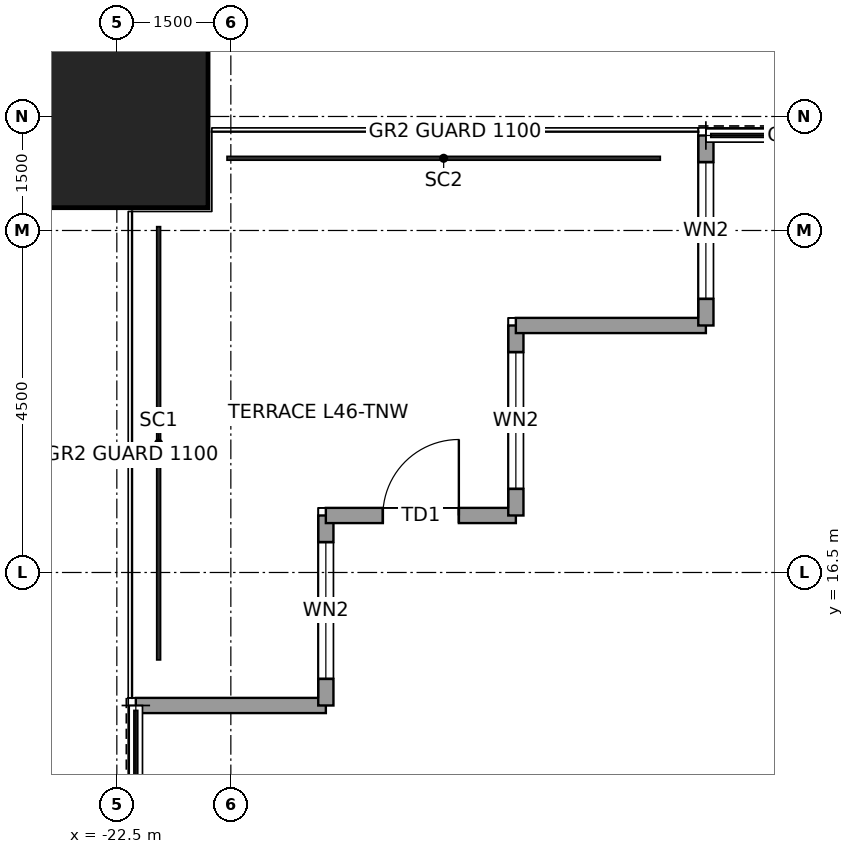
"""IFC4 building model, lengths in metres.
Left out: names, types, materials, properties, quantities, classifications, styles, units other than length and angle.
Written with IfcOpenShell. Run it as: python <this file> out.ifc"""

import sys

from ifc_helpers import new_model, si_unit, direction, frame, frame_2d, origin, origin_2d, place, context, subcontext, project, spatial, rectangle, hollow_rectangle, extrude, element, fill, save


model = new_model("IFC4")
c1 = context("Model", 3, precision=1e-05, world=origin(), true_north=direction((0.0, 1.0)))
c2 = subcontext(c1, "Body", "Model", "MODEL_VIEW")
j1 = project(units=[si_unit("LENGTHUNIT", "METRE"), si_unit("PLANEANGLEUNIT", "RADIAN")], contexts=[c1])
p1 = place(None, origin())
s1 = spatial("IfcSite", under=j1, at=p1, CompositionType="ELEMENT")
p2 = place(p1, origin())
s2 = spatial("IfcBuilding", under=s1, at=p2, CompositionType="ELEMENT")
p3 = place(p2, frame((0.0, 0.0, 217.9)))
s3 = spatial("IfcBuildingStorey", under=s2, at=p3, CompositionType="ELEMENT", Elevation=217.9)
p4 = place(p3, frame((-22.5, 22.5, 0.0), z_axis=(0.0, 0.0, 1.0), x_axis=(1.0, 0.0, 0.0)))
e1 = element("IfcColumn", 1, at=p4, inside=s3, PredefinedType="COLUMN", context=c2, shape_type="SweptSolid", body=[
    extrude(hollow_rectangle(XDim=2.4, YDim=2.4, WallThickness=0.12, at=origin_2d()), origin(), (0.0, 0.0, 1.0), 4.0),
])
p5 = place(p3, frame((-22.25, 14.75, 0.0), z_axis=(0.0, 0.0, 1.0), x_axis=(1.0, 0.0, 0.0)))
e2 = element("IfcWall", 2, at=p5, inside=s3, PredefinedType="SOLIDWALL", context=c2, shape_type="SweptSolid", body=[
    extrude(rectangle(XDim=2.5, YDim=0.2, at=frame_2d((1.25, 0.0))), origin(), (0.0, 0.0, 1.0), 3.85),
])
p6 = place(p3, frame((-19.75, 14.75, 0.0), z_axis=(0.0, 0.0, 1.0), x_axis=(0.0, 1.0, 0.0)))
e3 = element("IfcWall", 3, at=p6, inside=s3, PredefinedType="SOLIDWALL", context=c2, shape_type="SweptSolid", body=[
    extrude(rectangle(XDim=2.5, YDim=0.2, at=frame_2d((1.25, 0.0))), origin(), (0.0, 0.0, 1.0), 3.85),
])
p7 = place(p6, frame((0.35, 0.0, 0.3)))
e4 = element("IfcOpeningElement", 4, at=p7, cuts=e3, PredefinedType="OPENING", context=c2, shape_type="SweptSolid", body=[
    extrude(rectangle(XDim=1.8, YDim=2.4, at=frame_2d((0.9, 1.2))), frame((0.0, 0.11, 0.0), z_axis=(0.0, -1.0, 0.0), x_axis=(1.0, 0.0, 0.0)), (0.0, 0.0, 1.0), 0.22),
])
p8 = place(p3, frame((-19.75, 17.25, 0.0), z_axis=(0.0, 0.0, 1.0), x_axis=(1.0, 0.0, 0.0)))
e5 = element("IfcWall", 5, at=p8, inside=s3, PredefinedType="SOLIDWALL", context=c2, shape_type="SweptSolid", body=[
    extrude(rectangle(XDim=2.5, YDim=0.2, at=frame_2d((1.25, 0.0))), origin(), (0.0, 0.0, 1.0), 3.85),
])
p9 = place(p8, frame((0.75, 0.0, 0.0)))
e6 = element("IfcOpeningElement", 6, at=p9, cuts=e5, PredefinedType="OPENING", context=c2, shape_type="SweptSolid", body=[
    extrude(rectangle(XDim=1.0, YDim=2.4, at=frame_2d((0.5, 1.2))), frame((0.0, 0.11, 0.0), z_axis=(0.0, -1.0, 0.0), x_axis=(1.0, 0.0, 0.0)), (0.0, 0.0, 1.0), 0.22),
])
p10 = place(p3, frame((-17.25, 17.25, 0.0), z_axis=(0.0, 0.0, 1.0), x_axis=(0.0, 1.0, 0.0)))
e7 = element("IfcWall", 7, at=p10, inside=s3, PredefinedType="SOLIDWALL", context=c2, shape_type="SweptSolid", body=[
    extrude(rectangle(XDim=2.5, YDim=0.2, at=frame_2d((1.25, 0.0))), origin(), (0.0, 0.0, 1.0), 3.85),
])
p11 = place(p10, frame((0.35, 0.0, 0.3)))
e8 = element("IfcOpeningElement", 8, at=p11, cuts=e7, PredefinedType="OPENING", context=c2, shape_type="SweptSolid", body=[
    extrude(rectangle(XDim=1.8, YDim=2.4, at=frame_2d((0.9, 1.2))), frame((0.0, 0.11, 0.0), z_axis=(0.0, -1.0, 0.0), x_axis=(1.0, 0.0, 0.0)), (0.0, 0.0, 1.0), 0.22),
])
p12 = place(p3, frame((-17.25, 19.75, 0.0), z_axis=(0.0, 0.0, 1.0), x_axis=(1.0, 0.0, 0.0)))
e9 = element("IfcWall", 9, at=p12, inside=s3, PredefinedType="SOLIDWALL", context=c2, shape_type="SweptSolid", body=[
    extrude(rectangle(XDim=2.5, YDim=0.2, at=frame_2d((1.25, 0.0))), origin(), (0.0, 0.0, 1.0), 3.85),
])
p13 = place(p3, frame((-14.75, 19.75, 0.0), z_axis=(0.0, 0.0, 1.0), x_axis=(0.0, 1.0, 0.0)))
e10 = element("IfcWall", 10, at=p13, inside=s3, PredefinedType="SOLIDWALL", context=c2, shape_type="SweptSolid", body=[
    extrude(rectangle(XDim=2.5, YDim=0.2, at=frame_2d((1.25, 0.0))), origin(), (0.0, 0.0, 1.0), 3.85),
])
p14 = place(p13, frame((0.35, 0.0, 0.3)))
e11 = element("IfcOpeningElement", 11, at=p14, cuts=e10, PredefinedType="OPENING", context=c2, shape_type="SweptSolid", body=[
    extrude(rectangle(XDim=1.8, YDim=2.4, at=frame_2d((0.9, 1.2))), frame((0.0, 0.11, 0.0), z_axis=(0.0, -1.0, 0.0), x_axis=(1.0, 0.0, 0.0)), (0.0, 0.0, 1.0), 0.22),
])
p15 = place(p7, origin())
e12 = element("IfcWindow", 12, at=p15, inside=s3, PartitioningType="SINGLE_PANEL", PredefinedType="WINDOW", context=c2, shape_type="SweptSolid", body=[
    extrude(rectangle(XDim=1.8, YDim=2.4, at=frame_2d((0.9, 1.2))), frame((0.0, 0.03, 0.0), z_axis=(0.0, -1.0, 0.0), x_axis=(1.0, 0.0, 0.0)), (0.0, 0.0, 1.0), 0.06),
])
fill(e4, e12)
p16 = place(p9, origin())
e13 = element("IfcDoor", 13, at=p16, inside=s3, OperationType="SINGLE_SWING_RIGHT", PredefinedType="DOOR", context=c2, shape_type="SweptSolid", body=[
    extrude(rectangle(XDim=1.0, YDim=2.4, at=frame_2d((0.5, 1.2))), frame((0.0, 0.025, 0.0), z_axis=(0.0, -1.0, 0.0), x_axis=(1.0, 0.0, 0.0)), (0.0, 0.0, 1.0), 0.05),
])
fill(e6, e13)
p17 = place(p11, origin())
e14 = element("IfcWindow", 14, at=p17, inside=s3, PartitioningType="SINGLE_PANEL", PredefinedType="WINDOW", context=c2, shape_type="SweptSolid", body=[
    extrude(rectangle(XDim=1.8, YDim=2.4, at=frame_2d((0.9, 1.2))), frame((0.0, 0.03, 0.0), z_axis=(0.0, -1.0, 0.0), x_axis=(1.0, 0.0, 0.0)), (0.0, 0.0, 1.0), 0.06),
])
fill(e8, e14)
p18 = place(p14, origin())
e15 = element("IfcWindow", 15, at=p18, inside=s3, PartitioningType="SINGLE_PANEL", PredefinedType="WINDOW", context=c2, shape_type="SweptSolid", body=[
    extrude(rectangle(XDim=1.8, YDim=2.4, at=frame_2d((0.9, 1.2))), frame((0.0, 0.03, 0.0), z_axis=(0.0, -1.0, 0.0), x_axis=(1.0, 0.0, 0.0)), (0.0, 0.0, 1.0), 0.06),
])
fill(e11, e15)
save(model, sys.argv[1])
